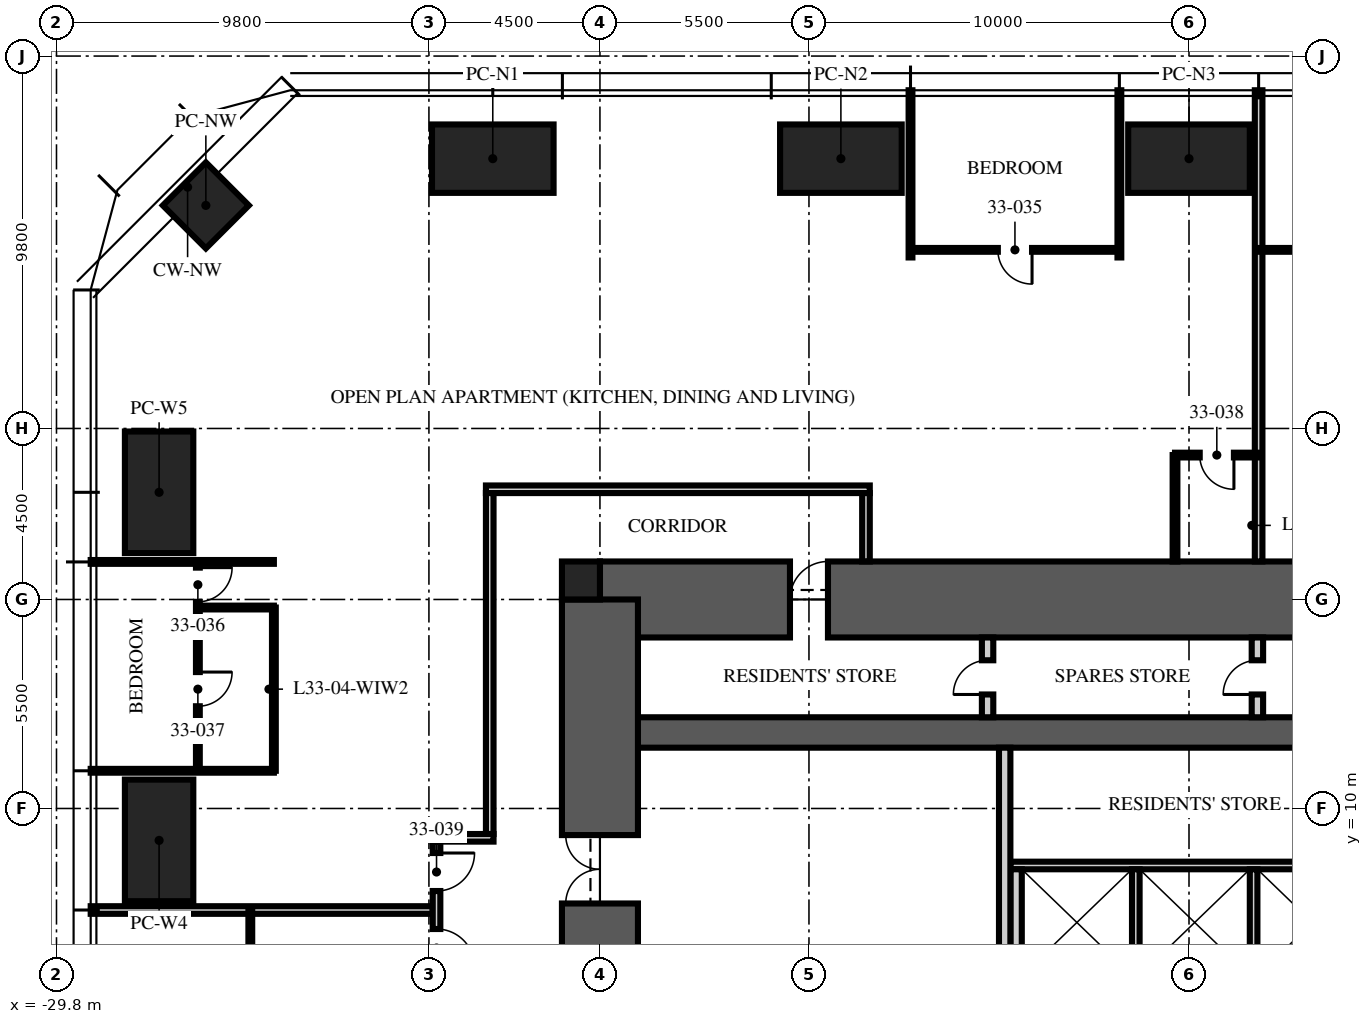
"""IFC4 building model, lengths in metres.
Left out: names, types, materials, properties, quantities, classifications, styles, units other than length and angle.
Written with IfcOpenShell. Run it as: python <this file> out.ifc"""

import sys

from ifc_helpers import new_model, si_unit, direction, frame, frame_2d, origin, origin_2d, place, context, subcontext, project, spatial, rectangle, extrude, element, fill, save


model = new_model("IFC4")
c1 = context("Model", 3, precision=1e-05, world=origin(), true_north=direction((0.0, 1.0)))
c2 = subcontext(c1, "Body", "Model", "MODEL_VIEW")
j1 = project(units=[si_unit("LENGTHUNIT", "METRE"), si_unit("PLANEANGLEUNIT", "RADIAN")], contexts=[c1])
p1 = place(None, origin())
s1 = spatial("IfcSite", under=j1, at=p1, CompositionType="ELEMENT")
p2 = place(p1, origin())
s2 = spatial("IfcBuilding", under=s1, at=p2, CompositionType="ELEMENT")
p3 = place(p2, frame((0.0, 0.0, 133.5)))
s3 = spatial("IfcBuildingStorey", under=s2, at=p3, CompositionType="ELEMENT", Elevation=133.5)
p4 = place(p3, frame((-15.5, 15.5, -0.25), z_axis=(0.0, 0.0, 1.0), x_axis=(1.0, 0.0, 0.0)))
e1 = element("IfcWall", 1, at=p4, inside=s3, PredefinedType="SHEAR", context=c2, shape_type="SweptSolid", body=[
    extrude(rectangle(XDim=31.0, YDim=2.0, at=frame_2d((15.5, 0.0))), origin(), (0.0, 0.0, 1.0), 3.75),
])
p5 = place(p4, frame((5.0, 0.0, 0.25)))
e2 = element("IfcOpeningElement", 2, at=p5, cuts=e1, PredefinedType="OPENING", context=c2, shape_type="SweptSolid", body=[
    extrude(rectangle(XDim=1.0, YDim=2.1, at=frame_2d((0.5, 1.05))), frame((0.0, 1.01, 0.0), z_axis=(0.0, -1.0, 0.0), x_axis=(1.0, 0.0, 0.0)), (0.0, 0.0, 1.0), 2.02),
])
p6 = place(p3, frame((-15.5, 12.0, -0.25), z_axis=(0.0, 0.0, 1.0), x_axis=(1.0, 0.0, 0.0)))
e3 = element("IfcWall", 3, at=p6, inside=s3, PredefinedType="SHEAR", context=c2, shape_type="SweptSolid", body=[
    extrude(rectangle(XDim=31.0, YDim=0.8, at=frame_2d((15.5, 0.0))), origin(), (0.0, 0.0, 1.0), 3.75),
])
p7 = place(p3, frame((-15.5, -15.5, -0.25), z_axis=(0.0, 0.0, 1.0), x_axis=(0.0, 1.0, 0.0)))
e4 = element("IfcWall", 4, at=p7, inside=s3, PredefinedType="SHEAR", context=c2, shape_type="SweptSolid", body=[
    extrude(rectangle(XDim=31.0, YDim=2.0, at=frame_2d((15.5, 0.0))), origin(), (0.0, 0.0, 1.0), 3.75),
])
p8 = place(p7, frame((6.5, 0.0, 0.25)))
e5 = element("IfcOpeningElement", 5, at=p8, cuts=e4, PredefinedType="OPENING", context=c2, shape_type="SweptSolid", body=[
    extrude(rectangle(XDim=1.2, YDim=2.1, at=frame_2d((0.6, 1.05))), frame((0.0, 1.01, 0.0), z_axis=(0.0, -1.0, 0.0), x_axis=(1.0, 0.0, 0.0)), (0.0, 0.0, 1.0), 2.02),
])
p9 = place(p7, frame((23.0, 0.0, 0.25)))
e6 = element("IfcOpeningElement", 6, at=p9, cuts=e4, PredefinedType="OPENING", context=c2, shape_type="SweptSolid", body=[
    extrude(rectangle(XDim=1.8, YDim=2.1, at=frame_2d((0.9, 1.05))), frame((0.0, 1.01, 0.0), z_axis=(0.0, -1.0, 0.0), x_axis=(1.0, 0.0, 0.0)), (0.0, 0.0, 1.0), 2.02),
])
p10 = place(p3, frame((-16.0, 16.0, -0.25), z_axis=(0.0, 0.0, 1.0), x_axis=(1.0, 0.0, 0.0)))
e7 = element("IfcColumn", 7, at=p10, inside=s3, PredefinedType="COLUMN", context=c2, shape_type="SweptSolid", body=[
    extrude(rectangle(XDim=1.0, YDim=1.0, at=origin_2d()), origin(), (0.0, 0.0, 1.0), 3.75),
])
for number, where, z_axis, x_axis in (
    (8, (-18.32, 27.1, 0.0), (0.0, 0.0, 1.0), (1.0, 0.0, 0.0)),
    (9, (-9.16, 27.1, 0.0), (0.0, 0.0, 1.0), (1.0, 0.0, 0.0)),
    (10, (0.0, 27.1, 0.0), (0.0, 0.0, 1.0), (1.0, 0.0, 0.0)),
    (11, (-27.1, 9.16, 0.0), (0.0, 0.0, 1.0), (0.0, 1.0, 0.0)),
    (12, (-27.1, 18.32, 0.0), (0.0, 0.0, 1.0), (0.0, 1.0, 0.0)),
):
    element("IfcColumn", number, at=place(p3, frame(where, z_axis=z_axis, x_axis=x_axis)), inside=s3, PredefinedType="COLUMN", context=c2, shape_type="SweptSolid", body=[
        extrude(rectangle(XDim=3.2, YDim=1.8, at=origin_2d()), origin(), (0.0, 0.0, 1.0), 3.75),
    ])
p11 = place(p3, frame((-25.87, 25.87, 0.0), z_axis=(0.0, 0.0, 1.0), x_axis=(0.707106781187, 0.707106781187, 0.0)))
e13 = element("IfcColumn", 13, at=p11, inside=s3, PredefinedType="COLUMN", context=c2, shape_type="SweptSolid", body=[
    extrude(rectangle(XDim=1.6, YDim=1.6, at=origin_2d()), origin(), (0.0, 0.0, 1.0), 3.75),
])
p12 = place(p3, frame((-4.7, 8.5, 0.0), z_axis=(0.0, 0.0, 1.0), x_axis=(1.0, 0.0, 0.0)))
e14 = element("IfcWall", 14, at=p12, inside=s3, PredefinedType="PARTITIONING", context=c2, shape_type="SweptSolid", body=[
    extrude(rectangle(XDim=9.7, YDim=0.2, at=frame_2d((4.85, 0.0))), origin(), (0.0, 0.0, 1.0), 3.5),
])
p13 = place(p3, frame((-4.55, 5.6, 0.0), z_axis=(0.0, 0.0, 1.0), x_axis=(0.0, 1.0, 0.0)))
e15 = element("IfcWall", 15, at=p13, inside=s3, PredefinedType="PARTITIONING", context=c2, shape_type="SweptSolid", body=[
    extrude(rectangle(XDim=2.8, YDim=0.3, at=frame_2d((1.4, 0.0))), origin(), (0.0, 0.0, 1.0), 3.5),
])
for number, where, z_axis, x_axis in (
    (16, (-1.4, 5.6, 0.0), (0.0, 0.0, 1.0), (0.0, 1.0, 0.0)),
    (17, (1.7, 5.6, 0.0), (0.0, 0.0, 1.0), (0.0, 1.0, 0.0)),
):
    element("IfcWall", number, at=place(p3, frame(where, z_axis=z_axis, x_axis=x_axis)), inside=s3, PredefinedType="PARTITIONING", context=c2, shape_type="SweptSolid", body=[
        extrude(rectangle(XDim=2.8, YDim=0.2, at=frame_2d((1.4, 0.0))), origin(), (0.0, 0.0, 1.0), 3.5),
    ])
p14 = place(p3, frame((-4.85, 5.3, 0.0), z_axis=(0.0, 0.0, 1.0), x_axis=(0.0, 1.0, 0.0)))
e18 = element("IfcWall", 18, at=p14, inside=s3, PredefinedType="PARTITIONING", context=c2, shape_type="SweptSolid", body=[
    extrude(rectangle(XDim=6.3, YDim=0.3, at=frame_2d((3.15, 0.0))), origin(), (0.0, 0.0, 1.0), 3.5),
])
p15 = place(p3, frame((-5.3, 12.4, 0.0), z_axis=(0.0, 0.0, 1.0), x_axis=(0.0, 1.0, 0.0)))
e19 = element("IfcWall", 19, at=p15, inside=s3, PredefinedType="PARTITIONING", context=c2, shape_type="SweptSolid", body=[
    extrude(rectangle(XDim=2.1, YDim=0.3, at=frame_2d((1.05, 0.0))), origin(), (0.0, 0.0, 1.0), 3.5),
])
p16 = place(p15, frame((0.6, 0.0, 0.0)))
e20 = element("IfcOpeningElement", 20, at=p16, cuts=e19, PredefinedType="OPENING", context=c2, shape_type="SweptSolid", body=[
    extrude(rectangle(XDim=0.9, YDim=2.1, at=frame_2d((0.45, 1.05))), frame((0.0, 0.16, 0.0), z_axis=(0.0, -1.0, 0.0), x_axis=(1.0, 0.0, 0.0)), (0.0, 0.0, 1.0), 0.32),
])
p17 = place(p3, frame((1.8, 12.4, 0.0), z_axis=(0.0, 0.0, 1.0), x_axis=(0.0, 1.0, 0.0)))
e21 = element("IfcWall", 21, at=p17, inside=s3, PredefinedType="PARTITIONING", context=c2, shape_type="SweptSolid", body=[
    extrude(rectangle(XDim=2.1, YDim=0.3, at=frame_2d((1.05, 0.0))), origin(), (0.0, 0.0, 1.0), 3.5),
])
p18 = place(p17, frame((0.6, 0.0, 0.0)))
e22 = element("IfcOpeningElement", 22, at=p18, cuts=e21, PredefinedType="OPENING", context=c2, shape_type="SweptSolid", body=[
    extrude(rectangle(XDim=0.9, YDim=2.1, at=frame_2d((0.45, 1.05))), frame((0.0, 0.16, 0.0), z_axis=(0.0, -1.0, 0.0), x_axis=(1.0, 0.0, 0.0)), (0.0, 0.0, 1.0), 0.32),
])
p19 = place(p3, frame((-18.5, 18.4, 0.0), z_axis=(0.0, 0.0, 1.0), x_axis=(1.0, 0.0, 0.0)))
e23 = element("IfcWall", 23, at=p19, inside=s3, PredefinedType="PARTITIONING", context=c2, shape_type="SweptSolid", body=[
    extrude(rectangle(XDim=10.1, YDim=0.2, at=frame_2d((5.05, 0.0))), origin(), (0.0, 0.0, 1.0), 2.3),
])
p20 = place(p3, frame((-8.5, 18.3, 0.0), z_axis=(0.0, 0.0, 1.0), x_axis=(0.0, -1.0, 0.0)))
e24 = element("IfcWall", 24, at=p20, inside=s3, PredefinedType="PARTITIONING", context=c2, shape_type="SweptSolid", body=[
    extrude(rectangle(XDim=1.8, YDim=0.2, at=frame_2d((0.9, 0.0))), origin(), (0.0, 0.0, 1.0), 3.5),
])
p21 = place(p3, frame((1.832, 16.5, 0.0), z_axis=(0.0, 0.0, 1.0), x_axis=(0.0, 1.0, 0.0)))
e25 = element("IfcWall", 25, at=p21, inside=s3, PredefinedType="PARTITIONING", context=c2, shape_type="SweptSolid", body=[
    extrude(rectangle(XDim=12.4, YDim=0.2, at=frame_2d((6.2, 0.0))), origin(), (0.0, 0.0, 1.0), 2.81),
])
for number, where, z_axis, x_axis in (
    (26, (-1.832, 24.5, 0.0), (0.0, 0.0, 1.0), (0.0, 1.0, 0.0)),
    (27, (-7.328, 24.5, 0.0), (0.0, 0.0, 1.0), (0.0, 1.0, 0.0)),
):
    element("IfcWall", number, at=place(p3, frame(where, z_axis=z_axis, x_axis=x_axis)), inside=s3, PredefinedType="PARTITIONING", context=c2, shape_type="SweptSolid", body=[
        extrude(rectangle(XDim=4.4, YDim=0.1, at=frame_2d((2.2, 0.0))), origin(), (0.0, 0.0, 1.0), 2.81),
    ])
for number, where, z_axis, x_axis in (
    (28, (-24.08, 16.488, 0.0), (0.0, 0.0, 1.0), (-1.0, 0.0, 0.0)),
    (29, (-24.08, 10.992, 0.0), (0.0, 0.0, 1.0), (-1.0, 0.0, 0.0)),
):
    element("IfcWall", number, at=place(p3, frame(where, z_axis=z_axis, x_axis=x_axis)), inside=s3, PredefinedType="PARTITIONING", context=c2, shape_type="SweptSolid", body=[
        extrude(rectangle(XDim=4.82, YDim=0.1, at=frame_2d((2.41, 0.0))), origin(), (0.0, 0.0, 1.0), 2.81),
    ])
p22 = place(p3, frame((-19.9, 7.328, 0.0), z_axis=(0.0, 0.0, 1.0), x_axis=(-1.0, 0.0, 0.0)))
e30 = element("IfcWall", 30, at=p22, inside=s3, PredefinedType="PARTITIONING", context=c2, shape_type="SweptSolid", body=[
    extrude(rectangle(XDim=9.0, YDim=0.2, at=frame_2d((4.5, 0.0))), origin(), (0.0, 0.0, 1.0), 2.81),
])
p23 = place(p3, frame((7.328, 24.7, 0.0), z_axis=(0.0, 0.0, 1.0), x_axis=(-1.0, 0.0, 0.0)))
e31 = element("IfcWall", 31, at=p23, inside=s3, PredefinedType="PARTITIONING", context=c2, shape_type="SweptSolid", body=[
    extrude(rectangle(XDim=5.496, YDim=0.1, at=frame_2d((2.748, 0.0))), origin(), (0.0, 0.0, 1.0), 2.81),
])
p24 = place(p23, frame((2.298, 0.0, 0.0)))
e32 = element("IfcOpeningElement", 32, at=p24, cuts=e31, PredefinedType="OPENING", context=c2, shape_type="SweptSolid", body=[
    extrude(rectangle(XDim=0.9, YDim=2.1, at=frame_2d((0.45, 1.05))), frame((0.0, 0.06, 0.0), z_axis=(0.0, -1.0, 0.0), x_axis=(1.0, 0.0, 0.0)), (0.0, 0.0, 1.0), 0.12),
])
p25 = place(p3, frame((-1.832, 24.7, 0.0), z_axis=(0.0, 0.0, 1.0), x_axis=(-1.0, 0.0, 0.0)))
e33 = element("IfcWall", 33, at=p25, inside=s3, PredefinedType="PARTITIONING", context=c2, shape_type="SweptSolid", body=[
    extrude(rectangle(XDim=5.496, YDim=0.1, at=frame_2d((2.748, 0.0))), origin(), (0.0, 0.0, 1.0), 2.81),
])
p26 = place(p25, frame((2.298, 0.0, 0.0)))
e34 = element("IfcOpeningElement", 34, at=p26, cuts=e33, PredefinedType="OPENING", context=c2, shape_type="SweptSolid", body=[
    extrude(rectangle(XDim=0.9, YDim=2.1, at=frame_2d((0.45, 1.05))), frame((0.0, 0.06, 0.0), z_axis=(0.0, -1.0, 0.0), x_axis=(1.0, 0.0, 0.0)), (0.0, 0.0, 1.0), 0.12),
])
p27 = place(p3, frame((-26.08, 16.488, 0.0), z_axis=(0.0, 0.0, 1.0), x_axis=(0.0, -1.0, 0.0)))
e35 = element("IfcWall", 35, at=p27, inside=s3, PredefinedType="PARTITIONING", context=c2, shape_type="SweptSolid", body=[
    extrude(rectangle(XDim=5.496, YDim=0.1, at=frame_2d((2.748, 0.0))), origin(), (0.0, 0.0, 1.0), 2.81),
])
p28 = place(p27, frame((0.15, 0.0, 0.0)))
e36 = element("IfcOpeningElement", 36, at=p28, cuts=e35, PredefinedType="OPENING", context=c2, shape_type="SweptSolid", body=[
    extrude(rectangle(XDim=0.9, YDim=2.1, at=frame_2d((0.45, 1.05))), frame((0.0, 0.06, 0.0), z_axis=(0.0, -1.0, 0.0), x_axis=(1.0, 0.0, 0.0)), (0.0, 0.0, 1.0), 0.12),
])
p29 = place(p27, frame((2.898, 0.0, 0.0)))
e37 = element("IfcOpeningElement", 37, at=p29, cuts=e35, PredefinedType="OPENING", context=c2, shape_type="SweptSolid", body=[
    extrude(rectangle(XDim=0.9, YDim=2.1, at=frame_2d((0.45, 1.05))), frame((0.0, 0.06, 0.0), z_axis=(0.0, -1.0, 0.0), x_axis=(1.0, 0.0, 0.0)), (0.0, 0.0, 1.0), 0.12),
])
p30 = place(p3, frame((-24.08, 15.288, 0.0), z_axis=(0.0, 0.0, 1.0), x_axis=(-1.0, 0.0, 0.0)))
e38 = element("IfcWall", 38, at=p30, inside=s3, PredefinedType="PARTITIONING", context=c2, shape_type="SweptSolid", body=[
    extrude(rectangle(XDim=2.0, YDim=0.1, at=frame_2d((1.0, 0.0))), origin(), (0.0, 0.0, 1.0), 3.5),
])
p31 = place(p3, frame((-24.08, 15.288, 0.0), z_axis=(0.0, 0.0, 1.0), x_axis=(0.0, -1.0, 0.0)))
e39 = element("IfcWall", 39, at=p31, inside=s3, PredefinedType="PARTITIONING", context=c2, shape_type="SweptSolid", body=[
    extrude(rectangle(XDim=4.296, YDim=0.1, at=frame_2d((2.148, 0.0))), origin(), (0.0, 0.0, 1.0), 2.81),
])
p32 = place(p3, frame((1.832, 19.3, 0.0), z_axis=(0.0, 0.0, 1.0), x_axis=(-1.0, 0.0, 0.0)))
e40 = element("IfcWall", 40, at=p32, inside=s3, PredefinedType="PARTITIONING", context=c2, shape_type="SweptSolid", body=[
    extrude(rectangle(XDim=2.2, YDim=0.125, at=frame_2d((1.1, 0.0))), origin(), (0.0, 0.0, 1.0), 2.7),
])
p33 = place(p32, frame((0.65, 0.0, 0.0)))
e41 = element("IfcOpeningElement", 41, at=p33, cuts=e40, PredefinedType="OPENING", context=c2, shape_type="SweptSolid", body=[
    extrude(rectangle(XDim=0.9, YDim=2.1, at=frame_2d((0.45, 1.05))), frame((0.0, 0.073, 0.0), z_axis=(0.0, -1.0, 0.0), x_axis=(1.0, 0.0, 0.0)), (0.0, 0.0, 1.0), 0.145),
])
p34 = place(p3, frame((-0.368, 16.5, 0.0), z_axis=(0.0, 0.0, 1.0), x_axis=(0.0, 1.0, 0.0)))
e42 = element("IfcWall", 42, at=p34, inside=s3, PredefinedType="PARTITIONING", context=c2, shape_type="SweptSolid", body=[
    extrude(rectangle(XDim=2.8, YDim=0.125, at=frame_2d((1.4, 0.0))), origin(), (0.0, 0.0, 1.0), 3.5),
])
p35 = place(p3, frame((-24.7, 7.328, 0.0), z_axis=(0.0, 0.0, 1.0), x_axis=(0.0, -1.0, 0.0)))
e43 = element("IfcWall", 43, at=p35, inside=s3, PredefinedType="PARTITIONING", context=c2, shape_type="SweptSolid", body=[
    extrude(rectangle(XDim=5.496, YDim=0.1, at=frame_2d((2.748, 0.0))), origin(), (0.0, 0.0, 1.0), 2.81),
])
p36 = place(p35, frame((2.298, 0.0, 0.0)))
e44 = element("IfcOpeningElement", 44, at=p36, cuts=e43, PredefinedType="OPENING", context=c2, shape_type="SweptSolid", body=[
    extrude(rectangle(XDim=0.9, YDim=2.1, at=frame_2d((0.45, 1.05))), frame((0.0, 0.06, 0.0), z_axis=(0.0, -1.0, 0.0), x_axis=(1.0, 0.0, 0.0)), (0.0, 0.0, 1.0), 0.12),
])
p37 = place(p3, frame((-18.4, 18.3, 0.0), z_axis=(0.0, 0.0, 1.0), x_axis=(0.0, -1.0, 0.0)))
e45 = element("IfcWall", 45, at=p37, inside=s3, PredefinedType="PARTITIONING", context=c2, shape_type="SweptSolid", body=[
    extrude(rectangle(XDim=8.972, YDim=0.2, at=frame_2d((4.486, 0.0))), origin(), (0.0, 0.0, 1.0), 2.3),
])
p38 = place(p3, frame((-18.3, 9.228, 0.0), z_axis=(0.0, 0.0, 1.0), x_axis=(-1.0, 0.0, 0.0)))
e46 = element("IfcWall", 46, at=p38, inside=s3, PredefinedType="PARTITIONING", context=c2, shape_type="SweptSolid", body=[
    extrude(rectangle(XDim=1.6, YDim=0.2, at=frame_2d((0.8, 0.0))), origin(), (0.0, 0.0, 1.0), 2.7),
])
p39 = place(p3, frame((-19.8, 9.128, 0.0), z_axis=(0.0, 0.0, 1.0), x_axis=(0.0, -1.0, 0.0)))
e47 = element("IfcWall", 47, at=p39, inside=s3, PredefinedType="PARTITIONING", context=c2, shape_type="SweptSolid", body=[
    extrude(rectangle(XDim=3.6, YDim=0.2, at=frame_2d((1.8, 0.0))), origin(), (0.0, 0.0, 1.0), 2.7),
])
p40 = place(p39, frame((0.3, 0.0, 0.0)))
e48 = element("IfcOpeningElement", 48, at=p40, cuts=e47, PredefinedType="OPENING", context=c2, shape_type="SweptSolid", body=[
    extrude(rectangle(XDim=1.0, YDim=2.2, at=frame_2d((0.5, 1.1))), frame((0.0, 0.11, 0.0), z_axis=(0.0, -1.0, 0.0), x_axis=(1.0, 0.0, 0.0)), (0.0, 0.0, 1.0), 0.22),
])
p41 = place(p39, frame((2.3, 0.0, 0.0)))
e49 = element("IfcOpeningElement", 49, at=p41, cuts=e47, PredefinedType="OPENING", context=c2, shape_type="SweptSolid", body=[
    extrude(rectangle(XDim=1.0, YDim=2.2, at=frame_2d((0.5, 1.1))), frame((0.0, 0.11, 0.0), z_axis=(0.0, -1.0, 0.0), x_axis=(1.0, 0.0, 0.0)), (0.0, 0.0, 1.0), 0.22),
])
p42 = place(p9, origin())
e50 = element("IfcDoor", 50, at=p42, inside=s3, OperationType="DOUBLE_DOOR_SINGLE_SWING", PredefinedType="DOOR", context=c2, shape_type="SweptSolid", body=[
    extrude(rectangle(XDim=1.8, YDim=2.1, at=frame_2d((0.9, 1.05))), frame((0.0, 0.025, 0.0), z_axis=(0.0, -1.0, 0.0), x_axis=(1.0, 0.0, 0.0)), (0.0, 0.0, 1.0), 0.05),
])
fill(e6, e50)
p43 = place(p16, origin())
e51 = element("IfcDoor", 51, at=p43, inside=s3, OperationType="SINGLE_SWING_LEFT", PredefinedType="DOOR", context=c2, shape_type="SweptSolid", body=[
    extrude(rectangle(XDim=0.9, YDim=2.1, at=frame_2d((0.45, 1.05))), frame((0.0, 0.025, 0.0), z_axis=(0.0, -1.0, 0.0), x_axis=(1.0, 0.0, 0.0)), (0.0, 0.0, 1.0), 0.05),
])
fill(e20, e51)
p44 = place(p18, origin())
e52 = element("IfcDoor", 52, at=p44, inside=s3, OperationType="SINGLE_SWING_LEFT", PredefinedType="DOOR", context=c2, shape_type="SweptSolid", body=[
    extrude(rectangle(XDim=0.9, YDim=2.1, at=frame_2d((0.45, 1.05))), frame((0.0, 0.025, 0.0), z_axis=(0.0, -1.0, 0.0), x_axis=(1.0, 0.0, 0.0)), (0.0, 0.0, 1.0), 0.05),
])
fill(e22, e52)
p45 = place(p5, origin())
e53 = element("IfcDoor", 53, at=p45, inside=s3, OperationType="SINGLE_SWING_RIGHT", PredefinedType="DOOR", context=c2, shape_type="SweptSolid", body=[
    extrude(rectangle(XDim=1.0, YDim=2.1, at=frame_2d((0.5, 1.05))), frame((0.0, 0.025, 0.0), z_axis=(0.0, -1.0, 0.0), x_axis=(1.0, 0.0, 0.0)), (0.0, 0.0, 1.0), 0.05),
])
fill(e2, e53)
p46 = place(p26, origin())
e54 = element("IfcDoor", 54, at=p46, inside=s3, OperationType="SINGLE_SWING_LEFT", PredefinedType="DOOR", context=c2, shape_type="SweptSolid", body=[
    extrude(rectangle(XDim=0.9, YDim=2.1, at=frame_2d((0.45, 1.05))), frame((0.0, 0.025, 0.0), z_axis=(0.0, -1.0, 0.0), x_axis=(1.0, 0.0, 0.0)), (0.0, 0.0, 1.0), 0.05),
])
fill(e34, e54)
p47 = place(p28, origin())
e55 = element("IfcDoor", 55, at=p47, inside=s3, OperationType="SINGLE_SWING_LEFT", PredefinedType="DOOR", context=c2, shape_type="SweptSolid", body=[
    extrude(rectangle(XDim=0.9, YDim=2.1, at=frame_2d((0.45, 1.05))), frame((0.0, 0.025, 0.0), z_axis=(0.0, -1.0, 0.0), x_axis=(1.0, 0.0, 0.0)), (0.0, 0.0, 1.0), 0.05),
])
fill(e36, e55)
p48 = place(p29, origin())
e56 = element("IfcDoor", 56, at=p48, inside=s3, OperationType="SINGLE_SWING_LEFT", PredefinedType="DOOR", context=c2, shape_type="SweptSolid", body=[
    extrude(rectangle(XDim=0.9, YDim=2.1, at=frame_2d((0.45, 1.05))), frame((0.0, 0.025, 0.0), z_axis=(0.0, -1.0, 0.0), x_axis=(1.0, 0.0, 0.0)), (0.0, 0.0, 1.0), 0.05),
])
fill(e37, e56)
p49 = place(p33, origin())
e57 = element("IfcDoor", 57, at=p49, inside=s3, OperationType="SINGLE_SWING_LEFT", PredefinedType="DOOR", context=c2, shape_type="SweptSolid", body=[
    extrude(rectangle(XDim=0.9, YDim=2.1, at=frame_2d((0.45, 1.05))), frame((0.0, 0.025, 0.0), z_axis=(0.0, -1.0, 0.0), x_axis=(1.0, 0.0, 0.0)), (0.0, 0.0, 1.0), 0.05),
])
fill(e41, e57)
p50 = place(p40, origin())
e58 = element("IfcDoor", 58, at=p50, inside=s3, OperationType="SINGLE_SWING_LEFT", PredefinedType="DOOR", context=c2, shape_type="SweptSolid", body=[
    extrude(rectangle(XDim=1.0, YDim=2.2, at=frame_2d((0.5, 1.1))), frame((0.0, 0.025, 0.0), z_axis=(0.0, -1.0, 0.0), x_axis=(1.0, 0.0, 0.0)), (0.0, 0.0, 1.0), 0.05),
])
fill(e48, e58)
p51 = place(p41, origin())
e59 = element("IfcDoor", 59, at=p51, inside=s3, OperationType="SINGLE_SWING_RIGHT", PredefinedType="DOOR", context=c2, shape_type="SweptSolid", body=[
    extrude(rectangle(XDim=1.0, YDim=2.2, at=frame_2d((0.5, 1.1))), frame((0.0, 0.025, 0.0), z_axis=(0.0, -1.0, 0.0), x_axis=(1.0, 0.0, 0.0)), (0.0, 0.0, 1.0), 0.05),
])
fill(e49, e59)
save(model, sys.argv[1])
